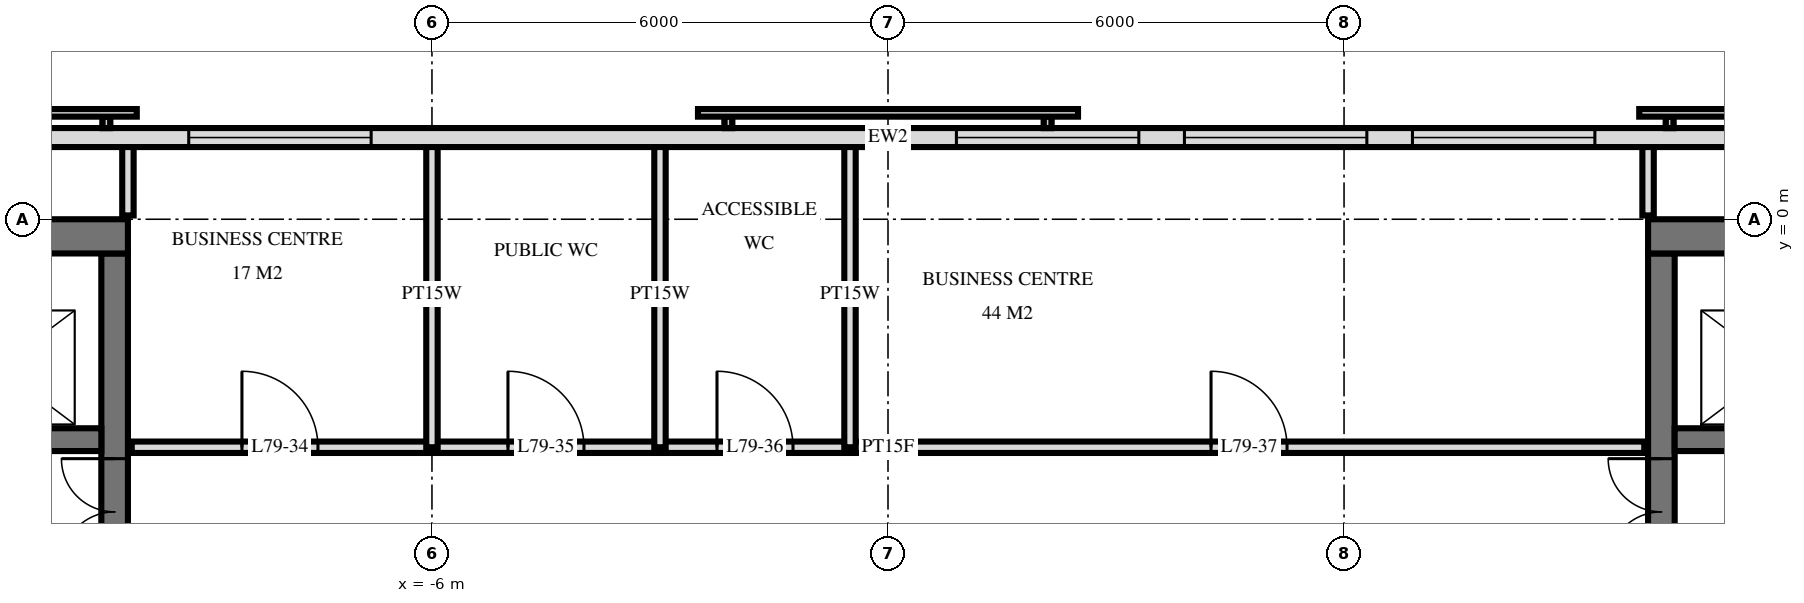
"""IFC4 building model, lengths in metres.
Left out: names, types, materials, properties, quantities, classifications, styles, units other than length and angle.
Written with IfcOpenShell. Run it as: python <this file> out.ifc"""

import sys

from ifc_helpers import new_model, si_unit, direction, frame, frame_2d, origin, place, context, subcontext, project, spatial, rectangle, extrude, element, fill, save


model = new_model("IFC4")
c1 = context("Model", 3, precision=1e-05, world=origin(), true_north=direction((0.0, 1.0)))
c2 = subcontext(c1, "Body", "Model", "MODEL_VIEW")
j1 = project(units=[si_unit("LENGTHUNIT", "METRE"), si_unit("PLANEANGLEUNIT", "RADIAN")], contexts=[c1])
p1 = place(None, origin())
s1 = spatial("IfcSite", under=j1, at=p1, CompositionType="ELEMENT")
p2 = place(p1, origin())
s2 = spatial("IfcBuilding", under=s1, at=p2, CompositionType="ELEMENT")
p3 = place(p2, frame((0.0, 0.0, 298.1)))
s3 = spatial("IfcBuildingStorey", under=s2, at=p3, CompositionType="ELEMENT", Elevation=298.1)
p4 = place(p3, frame((-19.5, -0.225, 0.0), z_axis=(0.0, 0.0, 1.0), x_axis=(1.0, 0.0, 0.0)))
e1 = element("IfcWall", 1, at=p4, inside=s3, PredefinedType="SHEAR", context=c2, shape_type="SweptSolid", body=[
    extrude(rectangle(XDim=9.5, YDim=0.45, at=frame_2d((4.75, 0.0))), origin(), (0.0, 0.0, 1.0), 3.5),
])
p5 = place(p3, frame((-10.175, -14.55, 0.0), z_axis=(0.0, 0.0, 1.0), x_axis=(0.0, 1.0, 0.0)))
e2 = element("IfcWall", 2, at=p5, inside=s3, PredefinedType="SHEAR", context=c2, shape_type="SweptSolid", body=[
    extrude(rectangle(XDim=14.1, YDim=0.35, at=frame_2d((7.05, 0.0))), origin(), (0.0, 0.0, 1.0), 3.5),
])
p6 = place(p5, frame((8.4, 0.0, 0.0)))
e3 = element("IfcOpeningElement", 3, at=p6, cuts=e2, PredefinedType="OPENING", context=c2, shape_type="SweptSolid", body=[
    extrude(rectangle(XDim=1.4, YDim=2.4, at=frame_2d((0.7, 1.2))), frame((0.0, 0.185, 0.0), z_axis=(0.0, -1.0, 0.0), x_axis=(1.0, 0.0, 0.0)), (0.0, 0.0, 1.0), 0.37),
])
p7 = place(p5, frame((10.0, 0.0, 0.0)))
e4 = element("IfcOpeningElement", 4, at=p7, cuts=e2, PredefinedType="OPENING", context=c2, shape_type="SweptSolid", body=[
    extrude(rectangle(XDim=1.4, YDim=2.4, at=frame_2d((0.7, 1.2))), frame((0.0, 0.185, 0.0), z_axis=(0.0, -1.0, 0.0), x_axis=(1.0, 0.0, 0.0)), (0.0, 0.0, 1.0), 0.37),
])
p8 = place(p5, frame((4.0, 0.0, 0.0)))
e5 = element("IfcOpeningElement", 5, at=p8, cuts=e2, PredefinedType="OPENING", context=c2, shape_type="SweptSolid", body=[
    extrude(rectangle(XDim=1.2, YDim=2.1, at=frame_2d((0.6, 1.05))), frame((0.0, 0.185, 0.0), z_axis=(0.0, -1.0, 0.0), x_axis=(1.0, 0.0, 0.0)), (0.0, 0.0, 1.0), 0.37),
])
p9 = place(p3, frame((-19.05, -2.9, 0.0), z_axis=(0.0, 0.0, 1.0), x_axis=(1.0, 0.0, 0.0)))
e6 = element("IfcWall", 6, at=p9, inside=s3, PredefinedType="SHEAR", context=c2, shape_type="SweptSolid", body=[
    extrude(rectangle(XDim=8.7, YDim=0.3, at=frame_2d((4.35, 0.0))), origin(), (0.0, 0.0, 1.0), 3.5),
])
p10 = place(p9, frame((6.8, 0.0, 0.0)))
e7 = element("IfcOpeningElement", 7, at=p10, cuts=e6, PredefinedType="OPENING", context=c2, shape_type="SweptSolid", body=[
    extrude(rectangle(XDim=1.1, YDim=2.1, at=frame_2d((0.55, 1.05))), frame((0.0, 0.16, 0.0), z_axis=(0.0, -1.0, 0.0), x_axis=(1.0, 0.0, 0.0)), (0.0, 0.0, 1.0), 0.32),
])
p11 = place(p9, frame((3.8, 0.0, 0.0)))
e8 = element("IfcOpeningElement", 8, at=p11, cuts=e6, PredefinedType="OPENING", context=c2, shape_type="SweptSolid", body=[
    extrude(rectangle(XDim=1.1, YDim=2.1, at=frame_2d((0.55, 1.05))), frame((0.0, 0.16, 0.0), z_axis=(0.0, -1.0, 0.0), x_axis=(1.0, 0.0, 0.0)), (0.0, 0.0, 1.0), 0.32),
])
p12 = place(p9, frame((1.863, 0.0, 0.0)))
e9 = element("IfcOpeningElement", 9, at=p12, cuts=e6, PredefinedType="OPENING", context=c2, shape_type="SweptSolid", body=[
    extrude(rectangle(XDim=0.9, YDim=2.1, at=frame_2d((0.45, 1.05))), frame((0.0, 0.16, 0.0), z_axis=(0.0, -1.0, 0.0), x_axis=(1.0, 0.0, 0.0)), (0.0, 0.0, 1.0), 0.32),
])
p13 = place(p9, frame((0.438, 0.0, 0.0)))
e10 = element("IfcOpeningElement", 10, at=p13, cuts=e6, PredefinedType="OPENING", context=c2, shape_type="SweptSolid", body=[
    extrude(rectangle(XDim=0.9, YDim=2.1, at=frame_2d((0.45, 1.05))), frame((0.0, 0.16, 0.0), z_axis=(0.0, -1.0, 0.0), x_axis=(1.0, 0.0, 0.0)), (0.0, 0.0, 1.0), 0.32),
])
p14 = place(p3, frame((10.0, -0.225, 0.0), z_axis=(0.0, 0.0, 1.0), x_axis=(1.0, 0.0, 0.0)))
e11 = element("IfcWall", 11, at=p14, inside=s3, PredefinedType="SHEAR", context=c2, shape_type="SweptSolid", body=[
    extrude(rectangle(XDim=9.5, YDim=0.45, at=frame_2d((4.75, 0.0))), origin(), (0.0, 0.0, 1.0), 3.5),
])
p15 = place(p3, frame((10.175, -14.55, 0.0), z_axis=(0.0, 0.0, 1.0), x_axis=(0.0, 1.0, 0.0)))
e12 = element("IfcWall", 12, at=p15, inside=s3, PredefinedType="SHEAR", context=c2, shape_type="SweptSolid", body=[
    extrude(rectangle(XDim=14.1, YDim=0.35, at=frame_2d((7.05, 0.0))), origin(), (0.0, 0.0, 1.0), 3.5),
])
p16 = place(p15, frame((8.4, 0.0, 0.0)))
e13 = element("IfcOpeningElement", 13, at=p16, cuts=e12, PredefinedType="OPENING", context=c2, shape_type="SweptSolid", body=[
    extrude(rectangle(XDim=1.4, YDim=2.4, at=frame_2d((0.7, 1.2))), frame((0.0, 0.185, 0.0), z_axis=(0.0, -1.0, 0.0), x_axis=(1.0, 0.0, 0.0)), (0.0, 0.0, 1.0), 0.37),
])
p17 = place(p15, frame((10.0, 0.0, 0.0)))
e14 = element("IfcOpeningElement", 14, at=p17, cuts=e12, PredefinedType="OPENING", context=c2, shape_type="SweptSolid", body=[
    extrude(rectangle(XDim=1.4, YDim=2.4, at=frame_2d((0.7, 1.2))), frame((0.0, 0.185, 0.0), z_axis=(0.0, -1.0, 0.0), x_axis=(1.0, 0.0, 0.0)), (0.0, 0.0, 1.0), 0.37),
])
p18 = place(p15, frame((4.0, 0.0, 0.0)))
e15 = element("IfcOpeningElement", 15, at=p18, cuts=e12, PredefinedType="OPENING", context=c2, shape_type="SweptSolid", body=[
    extrude(rectangle(XDim=1.2, YDim=2.1, at=frame_2d((0.6, 1.05))), frame((0.0, 0.185, 0.0), z_axis=(0.0, -1.0, 0.0), x_axis=(1.0, 0.0, 0.0)), (0.0, 0.0, 1.0), 0.37),
])
p19 = place(p3, frame((10.35, -2.9, 0.0), z_axis=(0.0, 0.0, 1.0), x_axis=(1.0, 0.0, 0.0)))
e16 = element("IfcWall", 16, at=p19, inside=s3, PredefinedType="SHEAR", context=c2, shape_type="SweptSolid", body=[
    extrude(rectangle(XDim=8.7, YDim=0.3, at=frame_2d((4.35, 0.0))), origin(), (0.0, 0.0, 1.0), 3.5),
])
p20 = place(p19, frame((0.8, 0.0, 0.0)))
e17 = element("IfcOpeningElement", 17, at=p20, cuts=e16, PredefinedType="OPENING", context=c2, shape_type="SweptSolid", body=[
    extrude(rectangle(XDim=1.1, YDim=2.1, at=frame_2d((0.55, 1.05))), frame((0.0, 0.16, 0.0), z_axis=(0.0, -1.0, 0.0), x_axis=(1.0, 0.0, 0.0)), (0.0, 0.0, 1.0), 0.32),
])
p21 = place(p19, frame((3.8, 0.0, 0.0)))
e18 = element("IfcOpeningElement", 18, at=p21, cuts=e16, PredefinedType="OPENING", context=c2, shape_type="SweptSolid", body=[
    extrude(rectangle(XDim=1.1, YDim=2.1, at=frame_2d((0.55, 1.05))), frame((0.0, 0.16, 0.0), z_axis=(0.0, -1.0, 0.0), x_axis=(1.0, 0.0, 0.0)), (0.0, 0.0, 1.0), 0.32),
])
p22 = place(p19, frame((5.938, 0.0, 0.0)))
e19 = element("IfcOpeningElement", 19, at=p22, cuts=e16, PredefinedType="OPENING", context=c2, shape_type="SweptSolid", body=[
    extrude(rectangle(XDim=0.9, YDim=2.1, at=frame_2d((0.45, 1.05))), frame((0.0, 0.16, 0.0), z_axis=(0.0, -1.0, 0.0), x_axis=(1.0, 0.0, 0.0)), (0.0, 0.0, 1.0), 0.32),
])
p23 = place(p19, frame((7.363, 0.0, 0.0)))
e20 = element("IfcOpeningElement", 20, at=p23, cuts=e16, PredefinedType="OPENING", context=c2, shape_type="SweptSolid", body=[
    extrude(rectangle(XDim=0.9, YDim=2.1, at=frame_2d((0.45, 1.05))), frame((0.0, 0.16, 0.0), z_axis=(0.0, -1.0, 0.0), x_axis=(1.0, 0.0, 0.0)), (0.0, 0.0, 1.0), 0.32),
])
p24 = place(p3, frame((18.575, 1.075, 0.0), z_axis=(0.0, 0.0, 1.0), x_axis=(-1.0, 0.0, 0.0)))
e21 = element("IfcWall", 21, at=p24, inside=s3, PredefinedType="SOLIDWALL", context=c2, shape_type="SweptSolid", body=[
    extrude(rectangle(XDim=37.151, YDim=0.25, at=frame_2d((18.575, 0.0))), origin(), (0.0, 0.0, 1.0), 3.22),
])
p25 = place(p24, frame((9.275, 0.0, 0.9)))
e22 = element("IfcOpeningElement", 22, at=p25, cuts=e21, PredefinedType="OPENING", context=c2, shape_type="SweptSolid", body=[
    extrude(rectangle(XDim=2.4, YDim=1.5, at=frame_2d((1.2, 0.75))), frame((0.0, 0.135, 0.0), z_axis=(0.0, -1.0, 0.0), x_axis=(1.0, 0.0, 0.0)), (0.0, 0.0, 1.0), 0.27),
])
p26 = place(p24, frame((12.275, 0.0, 0.9)))
e23 = element("IfcOpeningElement", 23, at=p26, cuts=e21, PredefinedType="OPENING", context=c2, shape_type="SweptSolid", body=[
    extrude(rectangle(XDim=2.4, YDim=1.5, at=frame_2d((1.2, 0.75))), frame((0.0, 0.135, 0.0), z_axis=(0.0, -1.0, 0.0), x_axis=(1.0, 0.0, 0.0)), (0.0, 0.0, 1.0), 0.27),
])
p27 = place(p24, frame((15.275, 0.0, 0.9)))
e24 = element("IfcOpeningElement", 24, at=p27, cuts=e21, PredefinedType="OPENING", context=c2, shape_type="SweptSolid", body=[
    extrude(rectangle(XDim=2.4, YDim=1.5, at=frame_2d((1.2, 0.75))), frame((0.0, 0.135, 0.0), z_axis=(0.0, -1.0, 0.0), x_axis=(1.0, 0.0, 0.0)), (0.0, 0.0, 1.0), 0.27),
])
p28 = place(p24, frame((25.375, 0.0, 0.9)))
e25 = element("IfcOpeningElement", 25, at=p28, cuts=e21, PredefinedType="OPENING", context=c2, shape_type="SweptSolid", body=[
    extrude(rectangle(XDim=2.4, YDim=1.5, at=frame_2d((1.2, 0.75))), frame((0.0, 0.135, 0.0), z_axis=(0.0, -1.0, 0.0), x_axis=(1.0, 0.0, 0.0)), (0.0, 0.0, 1.0), 0.27),
])
p29 = place(p3, frame((10.0, 0.05, 0.0), z_axis=(0.0, 0.0, 1.0), x_axis=(0.0, 1.0, 0.0)))
e26 = element("IfcWall", 26, at=p29, inside=s3, PredefinedType="PARTITIONING", context=c2, shape_type="SweptSolid", body=[
    extrude(rectangle(XDim=0.97, YDim=0.15, at=frame_2d((0.485, 0.0))), origin(), (0.0, 0.0, 1.0), 3.22),
])
for number, where, z_axis, x_axis in (
    (27, (-0.5, -3.0, 0.0), (0.0, 0.0, 1.0), (0.0, 1.0, 0.0)),
    (28, (-3.0, -3.0, 0.0), (0.0, 0.0, 1.0), (0.0, 1.0, 0.0)),
    (29, (-6.0, -3.0, 0.0), (0.0, 0.0, 1.0), (0.0, 1.0, 0.0)),
):
    element("IfcWall", number, at=place(p3, frame(where, z_axis=z_axis, x_axis=x_axis)), inside=s3, PredefinedType="PLUMBINGWALL", context=c2, shape_type="SweptSolid", body=[
        extrude(rectangle(XDim=4.02, YDim=0.15, at=frame_2d((2.01, 0.0))), origin(), (0.0, 0.0, 1.0), 3.22),
    ])
p30 = place(p3, frame((-10.0, 0.05, 0.0), z_axis=(0.0, 0.0, 1.0), x_axis=(0.0, 1.0, 0.0)))
e30 = element("IfcWall", 30, at=p30, inside=s3, PredefinedType="PARTITIONING", context=c2, shape_type="SweptSolid", body=[
    extrude(rectangle(XDim=0.97, YDim=0.15, at=frame_2d((0.485, 0.0))), origin(), (0.0, 0.0, 1.0), 3.22),
])
p31 = place(p3, frame((-9.95, -3.0, 0.0), z_axis=(0.0, 0.0, 1.0), x_axis=(1.0, 0.0, 0.0)))
e31 = element("IfcWall", 31, at=p31, inside=s3, PredefinedType="PARTITIONING", context=c2, shape_type="SweptSolid", body=[
    extrude(rectangle(XDim=19.9, YDim=0.15, at=frame_2d((9.95, 0.0))), origin(), (0.0, 0.0, 1.0), 3.22),
])
p32 = place(p31, frame((1.45, 0.0, 0.0)))
e32 = element("IfcOpeningElement", 32, at=p32, cuts=e31, PredefinedType="OPENING", context=c2, shape_type="SweptSolid", body=[
    extrude(rectangle(XDim=1.0, YDim=2.1, at=frame_2d((0.5, 1.05))), frame((0.0, 0.085, 0.0), z_axis=(0.0, -1.0, 0.0), x_axis=(1.0, 0.0, 0.0)), (0.0, 0.0, 1.0), 0.17),
])
p33 = place(p31, frame((4.95, 0.0, 0.0)))
e33 = element("IfcOpeningElement", 33, at=p33, cuts=e31, PredefinedType="OPENING", context=c2, shape_type="SweptSolid", body=[
    extrude(rectangle(XDim=1.0, YDim=2.1, at=frame_2d((0.5, 1.05))), frame((0.0, 0.085, 0.0), z_axis=(0.0, -1.0, 0.0), x_axis=(1.0, 0.0, 0.0)), (0.0, 0.0, 1.0), 0.17),
])
p34 = place(p31, frame((7.7, 0.0, 0.0)))
e34 = element("IfcOpeningElement", 34, at=p34, cuts=e31, PredefinedType="OPENING", context=c2, shape_type="SweptSolid", body=[
    extrude(rectangle(XDim=1.0, YDim=2.1, at=frame_2d((0.5, 1.05))), frame((0.0, 0.085, 0.0), z_axis=(0.0, -1.0, 0.0), x_axis=(1.0, 0.0, 0.0)), (0.0, 0.0, 1.0), 0.17),
])
p35 = place(p31, frame((14.2, 0.0, 0.0)))
e35 = element("IfcOpeningElement", 35, at=p35, cuts=e31, PredefinedType="OPENING", context=c2, shape_type="SweptSolid", body=[
    extrude(rectangle(XDim=1.0, YDim=2.1, at=frame_2d((0.5, 1.05))), frame((0.0, 0.085, 0.0), z_axis=(0.0, -1.0, 0.0), x_axis=(1.0, 0.0, 0.0)), (0.0, 0.0, 1.0), 0.17),
])
p36 = place(p25, origin())
e36 = element("IfcWindow", 36, at=p36, inside=s3, PartitioningType="SINGLE_PANEL", PredefinedType="WINDOW", context=c2, shape_type="SweptSolid", body=[
    extrude(rectangle(XDim=2.4, YDim=1.5, at=frame_2d((1.2, 0.75))), frame((0.0, 0.03, 0.0), z_axis=(0.0, -1.0, 0.0), x_axis=(1.0, 0.0, 0.0)), (0.0, 0.0, 1.0), 0.06),
])
fill(e22, e36)
p37 = place(p26, origin())
e37 = element("IfcWindow", 37, at=p37, inside=s3, PartitioningType="SINGLE_PANEL", PredefinedType="WINDOW", context=c2, shape_type="SweptSolid", body=[
    extrude(rectangle(XDim=2.4, YDim=1.5, at=frame_2d((1.2, 0.75))), frame((0.0, 0.03, 0.0), z_axis=(0.0, -1.0, 0.0), x_axis=(1.0, 0.0, 0.0)), (0.0, 0.0, 1.0), 0.06),
])
fill(e23, e37)
p38 = place(p27, origin())
e38 = element("IfcWindow", 38, at=p38, inside=s3, PartitioningType="SINGLE_PANEL", PredefinedType="WINDOW", context=c2, shape_type="SweptSolid", body=[
    extrude(rectangle(XDim=2.4, YDim=1.5, at=frame_2d((1.2, 0.75))), frame((0.0, 0.03, 0.0), z_axis=(0.0, -1.0, 0.0), x_axis=(1.0, 0.0, 0.0)), (0.0, 0.0, 1.0), 0.06),
])
fill(e24, e38)
p39 = place(p28, origin())
e39 = element("IfcWindow", 39, at=p39, inside=s3, PartitioningType="SINGLE_PANEL", PredefinedType="WINDOW", context=c2, shape_type="SweptSolid", body=[
    extrude(rectangle(XDim=2.4, YDim=1.5, at=frame_2d((1.2, 0.75))), frame((0.0, 0.03, 0.0), z_axis=(0.0, -1.0, 0.0), x_axis=(1.0, 0.0, 0.0)), (0.0, 0.0, 1.0), 0.06),
])
fill(e25, e39)
p40 = place(p7, origin())
e40 = element("IfcDoor", 40, at=p40, inside=s3, OperationType="DOUBLE_DOOR_SINGLE_SWING", PredefinedType="DOOR", context=c2, shape_type="SweptSolid", body=[
    extrude(rectangle(XDim=1.4, YDim=2.4, at=frame_2d((0.7, 1.2))), frame((0.0, 0.025, 0.0), z_axis=(0.0, -1.0, 0.0), x_axis=(1.0, 0.0, 0.0)), (0.0, 0.0, 1.0), 0.05),
])
fill(e4, e40)
p41 = place(p17, origin())
e41 = element("IfcDoor", 41, at=p41, inside=s3, OperationType="DOUBLE_DOOR_SINGLE_SWING", PredefinedType="DOOR", context=c2, shape_type="SweptSolid", body=[
    extrude(rectangle(XDim=1.4, YDim=2.4, at=frame_2d((0.7, 1.2))), frame((0.0, 0.025, 0.0), z_axis=(0.0, -1.0, 0.0), x_axis=(1.0, 0.0, 0.0)), (0.0, 0.0, 1.0), 0.05),
])
fill(e14, e41)
p42 = place(p32, origin())
e42 = element("IfcDoor", 42, at=p42, inside=s3, OperationType="SINGLE_SWING_RIGHT", PredefinedType="DOOR", context=c2, shape_type="SweptSolid", body=[
    extrude(rectangle(XDim=1.0, YDim=2.1, at=frame_2d((0.5, 1.05))), frame((0.0, 0.025, 0.0), z_axis=(0.0, -1.0, 0.0), x_axis=(1.0, 0.0, 0.0)), (0.0, 0.0, 1.0), 0.05),
])
fill(e32, e42)
p43 = place(p33, origin())
e43 = element("IfcDoor", 43, at=p43, inside=s3, OperationType="SINGLE_SWING_RIGHT", PredefinedType="DOOR", context=c2, shape_type="SweptSolid", body=[
    extrude(rectangle(XDim=1.0, YDim=2.1, at=frame_2d((0.5, 1.05))), frame((0.0, 0.025, 0.0), z_axis=(0.0, -1.0, 0.0), x_axis=(1.0, 0.0, 0.0)), (0.0, 0.0, 1.0), 0.05),
])
fill(e33, e43)
p44 = place(p34, origin())
e44 = element("IfcDoor", 44, at=p44, inside=s3, OperationType="SINGLE_SWING_RIGHT", PredefinedType="DOOR", context=c2, shape_type="SweptSolid", body=[
    extrude(rectangle(XDim=1.0, YDim=2.1, at=frame_2d((0.5, 1.05))), frame((0.0, 0.025, 0.0), z_axis=(0.0, -1.0, 0.0), x_axis=(1.0, 0.0, 0.0)), (0.0, 0.0, 1.0), 0.05),
])
fill(e34, e44)
p45 = place(p35, origin())
e45 = element("IfcDoor", 45, at=p45, inside=s3, OperationType="SINGLE_SWING_RIGHT", PredefinedType="DOOR", context=c2, shape_type="SweptSolid", body=[
    extrude(rectangle(XDim=1.0, YDim=2.1, at=frame_2d((0.5, 1.05))), frame((0.0, 0.025, 0.0), z_axis=(0.0, -1.0, 0.0), x_axis=(1.0, 0.0, 0.0)), (0.0, 0.0, 1.0), 0.05),
])
fill(e35, e45)
save(model, sys.argv[1])
